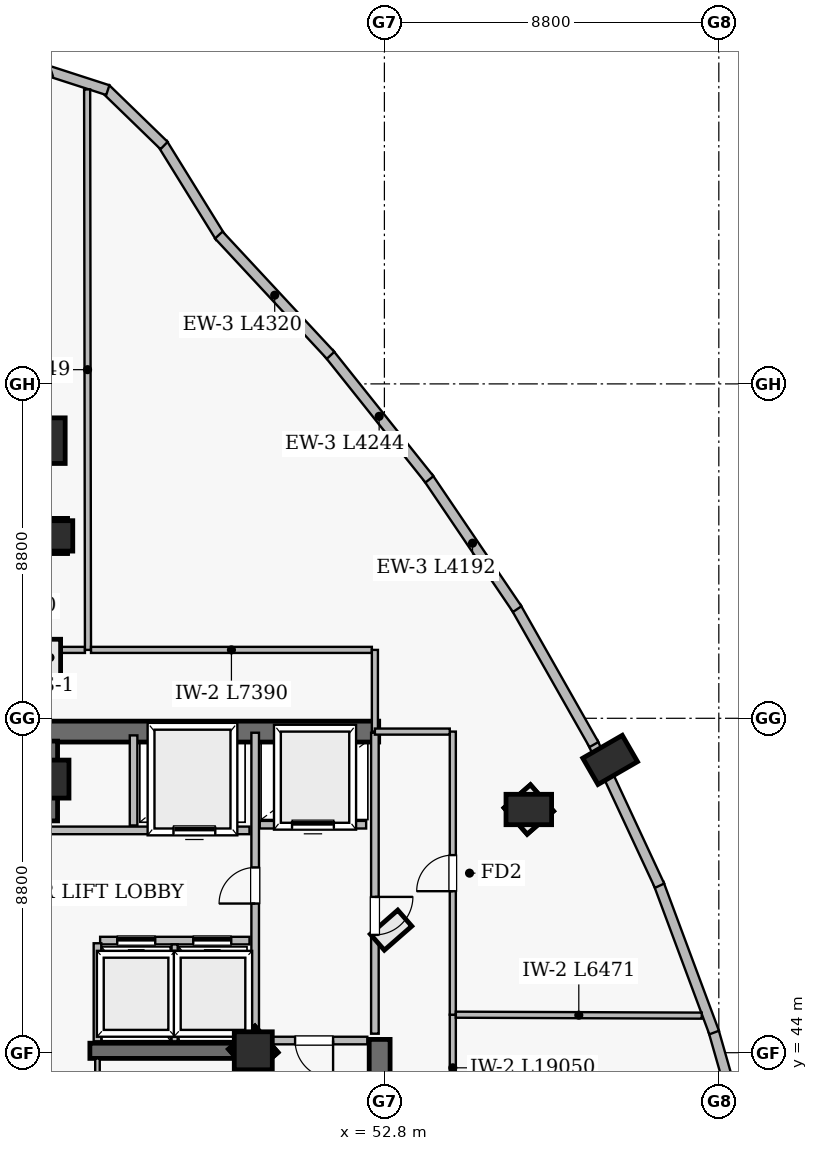
"""IFC4 building model, lengths in metres.
Left out: names, types, materials, properties, quantities, classifications, styles, units other than length and angle.
Written with IfcOpenShell. Run it as: python <this file> out.ifc"""

import sys

from ifc_helpers import new_model, si_unit, direction, frame, frame_2d, origin, origin_2d, place, context, subcontext, project, spatial, rectangle, extrude, element, fill, save


model = new_model("IFC4")
c1 = context("Model", 3, precision=1e-05, world=origin(), true_north=direction((0.0, 1.0)))
c2 = subcontext(c1, "Body", "Model", "MODEL_VIEW")
j1 = project(units=[si_unit("LENGTHUNIT", "METRE"), si_unit("PLANEANGLEUNIT", "RADIAN")], contexts=[c1])
p1 = place(None, origin())
s1 = spatial("IfcSite", under=j1, at=p1, CompositionType="ELEMENT")
p2 = place(p1, origin())
s2 = spatial("IfcBuilding", under=s1, at=p2, CompositionType="ELEMENT")
p3 = place(p2, frame((0.0, 0.0, 184.4)))
s3 = spatial("IfcBuildingStorey", under=s2, at=p3, CompositionType="ELEMENT", Elevation=184.4)
p4 = place(p3, frame((35.35, 52.45, 0.0), z_axis=(0.0, 0.0, 1.0), x_axis=(1.0, 0.0, 0.0)))
e1 = element("IfcWall", 1, at=p4, inside=s3, PredefinedType="SHEAR", context=c2, shape_type="SweptSolid", body=[
    extrude(rectangle(XDim=17.3, YDim=0.55, at=frame_2d((8.65, 0.0))), origin(), (0.0, 0.0, 1.0), 5.1),
])
p5 = place(p3, frame((52.675, 35.05, 0.0), z_axis=(0.0, 0.0, 1.0), x_axis=(0.0, 1.0, 0.0)))
e2 = element("IfcWall", 2, at=p5, inside=s3, PredefinedType="SHEAR", context=c2, shape_type="SweptSolid", body=[
    extrude(rectangle(XDim=9.3, YDim=0.55, at=frame_2d((4.65, 0.0))), origin(), (0.0, 0.0, 1.0), 5.1),
])
p6 = place(p3, frame((49.275, 35.4, 0.0), z_axis=(0.0, 0.0, 1.0), x_axis=(0.0, 1.0, 0.0)))
e3 = element("IfcWall", 3, at=p6, inside=s3, PredefinedType="SHEAR", context=c2, shape_type="SweptSolid", body=[
    extrude(rectangle(XDim=8.95, YDim=0.55, at=frame_2d((4.475, 0.0))), origin(), (0.0, 0.0, 1.0), 5.1),
])
p7 = place(p3, frame((44.0, 50.1, 0.0), z_axis=(0.0, 0.0, 1.0), x_axis=(0.0, 1.0, 0.0)))
e4 = element("IfcWall", 4, at=p7, inside=s3, PredefinedType="SHEAR", context=c2, shape_type="SweptSolid", body=[
    extrude(rectangle(XDim=2.1, YDim=0.4, at=frame_2d((1.05, 0.0))), origin(), (0.0, 0.0, 1.0), 5.1),
])
p8 = place(p3, frame((45.05, 44.05, 0.0), z_axis=(0.0, 0.0, 1.0), x_axis=(1.0, 0.0, 0.0)))
e5 = element("IfcWall", 5, at=p8, inside=s3, PredefinedType="SHEAR", context=c2, shape_type="SweptSolid", body=[
    extrude(rectangle(XDim=4.2, YDim=0.4, at=frame_2d((2.1, 0.0))), origin(), (0.0, 0.0, 1.0), 5.1),
])
for number, where, z_axis, x_axis in (
    (6, (49.35, 44.05, 0.0), (0.0, 0.0, 1.0), (1.0, 0.0, 0.0)),
    (7, (44.0, 51.2, 0.0), (0.0, 0.0, 1.0), (1.0, 0.0, 0.0)),
):
    element("IfcColumn", number, at=place(p3, frame(where, z_axis=z_axis, x_axis=x_axis)), inside=s3, PredefinedType="COLUMN", context=c2, shape_type="SweptSolid", body=[
        extrude(rectangle(XDim=1.0, YDim=1.0, at=origin_2d()), origin(), (0.0, 0.0, 1.0), 5.4),
    ])
for number, where, z_axis, x_axis in (
    (8, (44.0, 57.6, 0.0), (0.0, 0.0, 1.0), (1.0, 0.0, 0.0)),
    (9, (56.6, 50.4, 0.0), (0.0, 0.0, 1.0), (1.0, 0.0, 0.0)),
    (10, (44.0, 60.106, 0.0), (0.0, 0.0, 1.0), (0.0, 1.0, 0.0)),
    (11, (58.74, 51.705, 0.0), (0.0, 0.0, 1.0), (0.866, 0.5, 0.0)),
):
    element("IfcColumn", number, at=place(p3, frame(where, z_axis=z_axis, x_axis=x_axis)), inside=s3, PredefinedType="COLUMN", context=c2, shape_type="SweptSolid", body=[
        extrude(rectangle(XDim=1.2, YDim=0.8, at=origin_2d()), origin(), (0.0, 0.0, 1.0), 5.4),
    ])
p9 = place(p3, frame((48.485, 65.461, 0.0), z_axis=(0.0, 0.0, 1.0), x_axis=(-0.526073462403, 0.850439129012, 0.0)))
e12 = element("IfcWall", 12, at=p9, inside=s3, PredefinedType="SOLIDWALL", context=c2, shape_type="SweptSolid", body=[
    extrude(rectangle(XDim=2.9, YDim=0.27, at=frame_2d((1.45, 0.0))), origin(), (0.0, 0.0, 1.0), 5.1),
])
p10 = place(p3, frame((47.003, 67.873, 0.0), z_axis=(0.0, 0.0, 1.0), x_axis=(-0.717784851278, 0.696264969157, 0.0)))
e13 = element("IfcWall", 13, at=p10, inside=s3, PredefinedType="SOLIDWALL", context=c2, shape_type="SweptSolid", body=[
    extrude(rectangle(XDim=2.144, YDim=0.27, at=frame_2d((1.072, 0.0))), origin(), (0.0, 0.0, 1.0), 5.1),
])
for number, where, z_axis, x_axis in (
    (14, (45.522, 69.331, 0.0), (0.0, 0.0, 1.0), (-0.951, 0.308, 0.0)),
    (15, (44.033, 69.834, 0.0), (0.0, 0.0, 1.0), (-0.951, -0.308, 0.0)),
):
    element("IfcWall", number, at=place(p3, frame(where, z_axis=z_axis, x_axis=x_axis)), inside=s3, PredefinedType="SOLIDWALL", context=c2, shape_type="SweptSolid", body=[
        extrude(rectangle(XDim=1.635, YDim=0.27, at=frame_2d((0.817, 0.0))), origin(), (0.0, 0.0, 1.0), 5.1),
    ])
p11 = place(p3, frame((62.622, 40.516, 0.0), z_axis=(0.0, 0.0, 1.0), x_axis=(-0.274964238992, 0.961454454083, 0.0)))
e16 = element("IfcWall", 16, at=p11, inside=s3, PredefinedType="SOLIDWALL", context=c2, shape_type="SweptSolid", body=[
    extrude(rectangle(XDim=4.244, YDim=0.27, at=frame_2d((2.122, 0.0))), origin(), (0.0, 0.0, 1.0), 5.1),
])
p12 = place(p3, frame((61.477, 44.53, 0.0), z_axis=(0.0, 0.0, 1.0), x_axis=(-0.349022784807, 0.937114238333, 0.0)))
e17 = element("IfcWall", 17, at=p12, inside=s3, PredefinedType="SOLIDWALL", context=c2, shape_type="SweptSolid", body=[
    extrude(rectangle(XDim=4.192, YDim=0.27, at=frame_2d((2.096, 0.0))), origin(), (0.0, 0.0, 1.0), 5.1),
])
p13 = place(p3, frame((60.041, 48.394, 0.0), z_axis=(0.0, 0.0, 1.0), x_axis=(-0.422336806268, 0.906438978681, 0.0)))
e18 = element("IfcWall", 18, at=p13, inside=s3, PredefinedType="SOLIDWALL", context=c2, shape_type="SweptSolid", body=[
    extrude(rectangle(XDim=4.166, YDim=0.27, at=frame_2d((2.083, 0.0))), origin(), (0.0, 0.0, 1.0), 4.588),
])
p14 = place(p3, frame((58.313, 52.109, 0.0), z_axis=(0.0, 0.0, 1.0), x_axis=(-0.49336591454, 0.869821863585, 0.0)))
e19 = element("IfcWall", 19, at=p14, inside=s3, PredefinedType="SOLIDWALL", context=c2, shape_type="SweptSolid", body=[
    extrude(rectangle(XDim=4.166, YDim=0.27, at=frame_2d((2.083, 0.0))), origin(), (0.0, 0.0, 1.0), 4.588),
])
p15 = place(p3, frame((56.295, 55.673, 0.0), z_axis=(0.0, 0.0, 1.0), x_axis=(-0.560853295684, 0.827915201406, 0.0)))
e20 = element("IfcWall", 20, at=p15, inside=s3, PredefinedType="SOLIDWALL", context=c2, shape_type="SweptSolid", body=[
    extrude(rectangle(XDim=4.192, YDim=0.27, at=frame_2d((2.096, 0.0))), origin(), (0.0, 0.0, 1.0), 5.1),
])
p16 = place(p3, frame((53.985, 59.088, 0.0), z_axis=(0.0, 0.0, 1.0), x_axis=(-0.623600005041, 0.781743585655, 0.0)))
e21 = element("IfcWall", 21, at=p16, inside=s3, PredefinedType="SOLIDWALL", context=c2, shape_type="SweptSolid", body=[
    extrude(rectangle(XDim=4.244, YDim=0.27, at=frame_2d((2.122, 0.0))), origin(), (0.0, 0.0, 1.0), 5.1),
])
p17 = place(p3, frame((51.384, 62.352, 0.0), z_axis=(0.0, 0.0, 1.0), x_axis=(-0.68089748503, 0.732378737321, 0.0)))
e22 = element("IfcWall", 22, at=p17, inside=s3, PredefinedType="SOLIDWALL", context=c2, shape_type="SweptSolid", body=[
    extrude(rectangle(XDim=4.32, YDim=0.27, at=frame_2d((2.16, 0.0))), origin(), (0.0, 0.0, 1.0), 5.1),
])
p18 = place(p3, frame((54.6, 33.4, 0.0), z_axis=(0.0, 0.0, 1.0), x_axis=(0.0, 1.0, 0.0)))
e23 = element("IfcWall", 23, at=p18, inside=s3, PredefinedType="SOLIDWALL", context=c2, shape_type="SweptSolid", body=[
    extrude(rectangle(XDim=11.6, YDim=0.16, at=frame_2d((5.8, 0.0))), origin(), (0.0, 0.0, 1.0), 4.188),
])
p19 = place(p18, frame((4.605, 0.0, 0.0)))
e24 = element("IfcOpeningElement", 24, at=p19, cuts=e23, PredefinedType="OPENING", context=c2, shape_type="SweptSolid", body=[
    extrude(rectangle(XDim=0.95, YDim=2.15, at=frame_2d((0.475, 1.075))), frame((0.0, 0.09, 0.0), z_axis=(0.0, -1.0, 0.0), x_axis=(1.0, 0.0, 0.0)), (0.0, 0.0, 1.0), 0.18),
])
p20 = place(p3, frame((44.92, 54.6, 0.0), z_axis=(0.0, 0.0, 1.0), x_axis=(-1.0, 0.0, 0.0)))
e25 = element("IfcWall", 25, at=p20, inside=s3, PredefinedType="SOLIDWALL", context=c2, shape_type="SweptSolid", body=[
    extrude(rectangle(XDim=11.44, YDim=0.16, at=frame_2d((5.72, 0.0))), origin(), (0.0, 0.0, 1.0), 4.188),
])
p21 = place(p20, frame((5.245, 0.0, 0.0)))
e26 = element("IfcOpeningElement", 26, at=p21, cuts=e25, PredefinedType="OPENING", context=c2, shape_type="SweptSolid", body=[
    extrude(rectangle(XDim=0.95, YDim=2.15, at=frame_2d((0.475, 1.075))), frame((0.0, 0.09, 0.0), z_axis=(0.0, -1.0, 0.0), x_axis=(1.0, 0.0, 0.0)), (0.0, 0.0, 1.0), 0.18),
])
p22 = place(p3, frame((45.25, 35.6, 0.0), z_axis=(0.0, 0.0, 1.0), x_axis=(0.0, 1.0, 0.0)))
e27 = element("IfcWall", 27, at=p22, inside=s3, PredefinedType="PARTITIONING", context=c2, shape_type="SweptSolid", body=[
    extrude(rectangle(XDim=8.25, YDim=0.12, at=frame_2d((4.125, 0.0))), origin(), (0.0, 0.0, 1.0), 5.1),
])
p23 = place(p22, frame((2.05, 0.0, 0.0)))
e28 = element("IfcOpeningElement", 28, at=p23, cuts=e27, PredefinedType="OPENING", context=c2, shape_type="SweptSolid", body=[
    extrude(rectangle(XDim=0.9, YDim=2.1, at=frame_2d((0.45, 1.05))), frame((0.0, 0.07, 0.0), z_axis=(0.0, -1.0, 0.0), x_axis=(1.0, 0.0, 0.0)), (0.0, 0.0, 1.0), 0.14),
])
p24 = place(p22, frame((6.26, 0.0, 0.0)))
e29 = element("IfcOpeningElement", 29, at=p24, cuts=e27, PredefinedType="OPENING", context=c2, shape_type="SweptSolid", body=[
    extrude(rectangle(XDim=0.88, YDim=2.1, at=frame_2d((0.44, 1.05))), frame((0.0, 0.07, 0.0), z_axis=(0.0, -1.0, 0.0), x_axis=(1.0, 0.0, 0.0)), (0.0, 0.0, 1.0), 0.14),
])
p25 = place(p3, frame((52.55, 44.5, 0.0), z_axis=(0.0, 0.0, 1.0), x_axis=(0.0, 1.0, 0.0)))
e30 = element("IfcWall", 30, at=p25, inside=s3, PredefinedType="SOLIDWALL", context=c2, shape_type="SweptSolid", body=[
    extrude(rectangle(XDim=7.92, YDim=0.2, at=frame_2d((3.96, 0.0))), origin(), (0.0, 0.0, 1.0), 5.1),
])
p26 = place(p25, frame((2.6, 0.0, 0.0)))
e31 = element("IfcOpeningElement", 31, at=p26, cuts=e30, PredefinedType="OPENING", context=c2, shape_type="SweptSolid", body=[
    extrude(rectangle(XDim=1.0, YDim=2.15, at=frame_2d((0.5, 1.075))), frame((0.0, 0.11, 0.0), z_axis=(0.0, -1.0, 0.0), x_axis=(1.0, 0.0, 0.0)), (0.0, 0.0, 1.0), 0.22),
])
p27 = place(p3, frame((49.4, 44.5, 0.0), z_axis=(0.0, 0.0, 1.0), x_axis=(0.0, 1.0, 0.0)))
e32 = element("IfcWall", 32, at=p27, inside=s3, PredefinedType="SOLIDWALL", context=c2, shape_type="SweptSolid", body=[
    extrude(rectangle(XDim=7.92, YDim=0.2, at=frame_2d((3.96, 0.0))), origin(), (0.0, 0.0, 1.0), 4.188),
])
p28 = place(p27, frame((3.425, 0.0, 0.0)))
e33 = element("IfcOpeningElement", 33, at=p28, cuts=e32, PredefinedType="OPENING", context=c2, shape_type="SweptSolid", body=[
    extrude(rectangle(XDim=0.95, YDim=2.15, at=frame_2d((0.475, 1.075))), frame((0.0, 0.11, 0.0), z_axis=(0.0, -1.0, 0.0), x_axis=(1.0, 0.0, 0.0)), (0.0, 0.0, 1.0), 0.22),
])
p29 = place(p3, frame((54.6, 45.0, 0.0), z_axis=(0.0, 0.0, 1.0), x_axis=(0.0, 1.0, 0.0)))
e34 = element("IfcWall", 34, at=p29, inside=s3, PredefinedType="SOLIDWALL", context=c2, shape_type="SweptSolid", body=[
    extrude(rectangle(XDim=7.45, YDim=0.16, at=frame_2d((3.725, 0.0))), origin(), (0.0, 0.0, 1.0), 4.188),
])
p30 = place(p29, frame((3.25, 0.0, 0.0)))
e35 = element("IfcOpeningElement", 35, at=p30, cuts=e34, PredefinedType="OPENING", context=c2, shape_type="SweptSolid", body=[
    extrude(rectangle(XDim=0.95, YDim=2.15, at=frame_2d((0.475, 1.075))), frame((0.0, 0.09, 0.0), z_axis=(0.0, -1.0, 0.0), x_axis=(1.0, 0.0, 0.0)), (0.0, 0.0, 1.0), 0.18),
])
p31 = place(p3, frame((43.75, 49.85, 0.0), z_axis=(0.0, 0.0, 1.0), x_axis=(1.0, 0.0, 0.0)))
e36 = element("IfcWall", 36, at=p31, inside=s3, PredefinedType="SOLIDWALL", context=c2, shape_type="SweptSolid", body=[
    extrude(rectangle(XDim=5.5, YDim=0.2, at=frame_2d((2.75, 0.0))), origin(), (0.0, 0.0, 1.0), 4.188),
])
p32 = place(p31, frame((3.5, 0.0, 0.0)))
e37 = element("IfcOpeningElement", 37, at=p32, cuts=e36, PredefinedType="OPENING", context=c2, shape_type="SweptSolid", body=[
    extrude(rectangle(XDim=1.1, YDim=2.15, at=frame_2d((0.55, 1.075))), frame((0.0, 0.11, 0.0), z_axis=(0.0, -1.0, 0.0), x_axis=(1.0, 0.0, 0.0)), (0.0, 0.0, 1.0), 0.22),
])
p33 = place(p3, frame((45.32, 46.95, 0.0), z_axis=(0.0, 0.0, 1.0), x_axis=(1.0, 0.0, 0.0)))
e38 = element("IfcWall", 38, at=p33, inside=s3, PredefinedType="SOLIDWALL", context=c2, shape_type="SweptSolid", body=[
    extrude(rectangle(XDim=3.93, YDim=0.2, at=frame_2d((1.965, 0.0))), origin(), (0.0, 0.0, 1.0), 4.188),
])
p34 = place(p33, frame((0.45, 0.0, 0.0)))
e39 = element("IfcOpeningElement", 39, at=p34, cuts=e38, PredefinedType="OPENING", context=c2, shape_type="SweptSolid", body=[
    extrude(rectangle(XDim=1.0, YDim=2.15, at=frame_2d((0.5, 1.075))), frame((0.0, 0.11, 0.0), z_axis=(0.0, -1.0, 0.0), x_axis=(1.0, 0.0, 0.0)), (0.0, 0.0, 1.0), 0.22),
])
p35 = place(p33, frame((2.45, 0.0, 0.0)))
e40 = element("IfcOpeningElement", 40, at=p35, cuts=e38, PredefinedType="OPENING", context=c2, shape_type="SweptSolid", body=[
    extrude(rectangle(XDim=1.0, YDim=2.15, at=frame_2d((0.5, 1.075))), frame((0.0, 0.11, 0.0), z_axis=(0.0, -1.0, 0.0), x_axis=(1.0, 0.0, 0.0)), (0.0, 0.0, 1.0), 0.22),
])
p36 = place(p3, frame((49.55, 44.32, 0.0), z_axis=(0.0, 0.0, 1.0), x_axis=(1.0, 0.0, 0.0)))
e41 = element("IfcWall", 41, at=p36, inside=s3, PredefinedType="SOLIDWALL", context=c2, shape_type="SweptSolid", body=[
    extrude(rectangle(XDim=2.8, YDim=0.2, at=frame_2d((1.4, 0.0))), origin(), (0.0, 0.0, 1.0), 4.188),
])
p37 = place(p36, frame((0.9, 0.0, 0.0)))
e42 = element("IfcOpeningElement", 42, at=p37, cuts=e41, PredefinedType="OPENING", context=c2, shape_type="SweptSolid", body=[
    extrude(rectangle(XDim=1.0, YDim=2.15, at=frame_2d((0.5, 1.075))), frame((0.0, 0.11, 0.0), z_axis=(0.0, -1.0, 0.0), x_axis=(1.0, 0.0, 0.0)), (0.0, 0.0, 1.0), 0.22),
])
p38 = place(p3, frame((49.52, 50.0, 0.0), z_axis=(0.0, 0.0, 1.0), x_axis=(1.0, 0.0, 0.0)))
e43 = element("IfcWall", 43, at=p38, inside=s3, PredefinedType="SOLIDWALL", context=c2, shape_type="SweptSolid", body=[
    extrude(rectangle(XDim=2.8, YDim=0.2, at=frame_2d((1.4, 0.0))), origin(), (0.0, 0.0, 1.0), 5.1),
])
p39 = place(p38, frame((0.85, 0.0, 0.0)))
e44 = element("IfcOpeningElement", 44, at=p39, cuts=e43, PredefinedType="OPENING", context=c2, shape_type="SweptSolid", body=[
    extrude(rectangle(XDim=1.1, YDim=2.15, at=frame_2d((0.55, 1.075))), frame((0.0, 0.11, 0.0), z_axis=(0.0, -1.0, 0.0), x_axis=(1.0, 0.0, 0.0)), (0.0, 0.0, 1.0), 0.22),
])
p40 = place(p3, frame((45.0, 54.6, 0.0), z_axis=(0.0, 0.0, 1.0), x_axis=(-0.001489768591, 0.999998890294, 0.0)))
e45 = element("IfcWall", 45, at=p40, inside=s3, PredefinedType="SOLIDWALL", context=c2, shape_type="SweptSolid", body=[
    extrude(rectangle(XDim=14.749, YDim=0.16, at=frame_2d((7.375, 0.0))), origin(), (0.0, 0.0, 1.0), 4.188),
])
p41 = place(p3, frame((52.47, 54.6, 0.0), z_axis=(0.0, 0.0, 1.0), x_axis=(-1.0, 0.0, 0.0)))
e46 = element("IfcWall", 46, at=p41, inside=s3, PredefinedType="SOLIDWALL", context=c2, shape_type="SweptSolid", body=[
    extrude(rectangle(XDim=7.39, YDim=0.16, at=frame_2d((3.695, 0.0))), origin(), (0.0, 0.0, 1.0), 4.188),
])
p42 = place(p3, frame((61.151, 44.975, 0.0), z_axis=(0.0, 0.0, 1.0), x_axis=(-0.999992595258, 0.003848302008, 0.0)))
e47 = element("IfcWall", 47, at=p42, inside=s3, PredefinedType="SOLIDWALL", context=c2, shape_type="SweptSolid", body=[
    extrude(rectangle(XDim=6.471, YDim=0.16, at=frame_2d((3.235, 0.0))), origin(), (0.0, 0.0, 1.0), 4.188),
])
p43 = place(p3, frame((45.25, 44.3, 0.0), z_axis=(0.0, 0.0, 1.0), x_axis=(0.0, 1.0, 0.0)))
e48 = element("IfcWall", 48, at=p43, inside=s3, PredefinedType="SOLIDWALL", context=c2, shape_type="SweptSolid", body=[
    extrude(rectangle(XDim=2.58, YDim=0.2, at=frame_2d((1.29, 0.0))), origin(), (0.0, 0.0, 1.0), 5.1),
])
p44 = place(p3, frame((47.28, 44.3, 0.0), z_axis=(0.0, 0.0, 1.0), x_axis=(0.0, 1.0, 0.0)))
e49 = element("IfcWall", 49, at=p44, inside=s3, PredefinedType="SOLIDWALL", context=c2, shape_type="SweptSolid", body=[
    extrude(rectangle(XDim=2.55, YDim=0.16, at=frame_2d((1.275, 0.0))), origin(), (0.0, 0.0, 1.0), 4.188),
])
p45 = place(p3, frame((46.2, 49.98, 0.0), z_axis=(0.0, 0.0, 1.0), x_axis=(0.0, 1.0, 0.0)))
e50 = element("IfcWall", 50, at=p45, inside=s3, PredefinedType="SOLIDWALL", context=c2, shape_type="SweptSolid", body=[
    extrude(rectangle(XDim=2.37, YDim=0.2, at=frame_2d((1.185, 0.0))), origin(), (0.0, 0.0, 1.0), 5.1),
])
p46 = place(p3, frame((52.55, 52.45, 0.0), z_axis=(0.0, 0.0, 1.0), x_axis=(0.0, 1.0, 0.0)))
e51 = element("IfcWall", 51, at=p46, inside=s3, PredefinedType="SOLIDWALL", context=c2, shape_type="SweptSolid", body=[
    extrude(rectangle(XDim=2.15, YDim=0.16, at=frame_2d((1.075, 0.0))), origin(), (0.0, 0.0, 1.0), 4.188),
])
p47 = place(p3, frame((54.52, 52.45, 0.0), z_axis=(0.0, 0.0, 1.0), x_axis=(-1.0, 0.0, 0.0)))
e52 = element("IfcWall", 52, at=p47, inside=s3, PredefinedType="SOLIDWALL", context=c2, shape_type="SweptSolid", body=[
    extrude(rectangle(XDim=1.97, YDim=0.16, at=frame_2d((0.985, 0.0))), origin(), (0.0, 0.0, 1.0), 4.188),
])
p48 = place(p37, frame((1.0, 0.0, 0.0), z_axis=(0.0, 0.0, 1.0), x_axis=(-1.0, 0.0, 0.0)))
e53 = element("IfcDoor", 53, at=p48, inside=s3, OperationType="SINGLE_SWING_RIGHT", PredefinedType="DOOR", context=c2, shape_type="SweptSolid", body=[
    extrude(rectangle(XDim=1.0, YDim=2.15, at=frame_2d((0.5, 1.075))), frame((0.0, 0.025, 0.0), z_axis=(0.0, -1.0, 0.0), x_axis=(1.0, 0.0, 0.0)), (0.0, 0.0, 1.0), 0.05),
])
fill(e42, e53)
p49 = place(p26, frame((1.0, 0.0, 0.0), z_axis=(0.0, 0.0, 1.0), x_axis=(-1.0, 0.0, 0.0)))
e54 = element("IfcDoor", 54, at=p49, inside=s3, OperationType="SINGLE_SWING_RIGHT", PredefinedType="DOOR", context=c2, shape_type="SweptSolid", body=[
    extrude(rectangle(XDim=1.0, YDim=2.15, at=frame_2d((0.5, 1.075))), frame((0.0, 0.025, 0.0), z_axis=(0.0, -1.0, 0.0), x_axis=(1.0, 0.0, 0.0)), (0.0, 0.0, 1.0), 0.05),
])
fill(e31, e54)
p50 = place(p28, origin())
e55 = element("IfcDoor", 55, at=p50, inside=s3, OperationType="SINGLE_SWING_LEFT", PredefinedType="DOOR", context=c2, shape_type="SweptSolid", body=[
    extrude(rectangle(XDim=0.95, YDim=2.15, at=frame_2d((0.475, 1.075))), frame((0.0, 0.025, 0.0), z_axis=(0.0, -1.0, 0.0), x_axis=(1.0, 0.0, 0.0)), (0.0, 0.0, 1.0), 0.05),
])
fill(e33, e55)
p51 = place(p39, origin())
e56 = element("IfcDoor", 56, at=p51, inside=s3, OperationType="SLIDING_TO_LEFT", PredefinedType="DOOR", context=c2, shape_type="SweptSolid", body=[
    extrude(rectangle(XDim=1.1, YDim=2.15, at=frame_2d((0.55, 1.075))), frame((0.0, 0.025, 0.0), z_axis=(0.0, -1.0, 0.0), x_axis=(1.0, 0.0, 0.0)), (0.0, 0.0, 1.0), 0.05),
])
fill(e44, e56)
p52 = place(p32, origin())
e57 = element("IfcDoor", 57, at=p52, inside=s3, OperationType="SLIDING_TO_LEFT", PredefinedType="DOOR", context=c2, shape_type="SweptSolid", body=[
    extrude(rectangle(XDim=1.1, YDim=2.15, at=frame_2d((0.55, 1.075))), frame((0.0, 0.025, 0.0), z_axis=(0.0, -1.0, 0.0), x_axis=(1.0, 0.0, 0.0)), (0.0, 0.0, 1.0), 0.05),
])
fill(e37, e57)
p53 = place(p34, origin())
e58 = element("IfcDoor", 58, at=p53, inside=s3, OperationType="SLIDING_TO_LEFT", PredefinedType="DOOR", context=c2, shape_type="SweptSolid", body=[
    extrude(rectangle(XDim=1.0, YDim=2.15, at=frame_2d((0.5, 1.075))), frame((0.0, 0.025, 0.0), z_axis=(0.0, -1.0, 0.0), x_axis=(1.0, 0.0, 0.0)), (0.0, 0.0, 1.0), 0.05),
])
fill(e39, e58)
p54 = place(p35, origin())
e59 = element("IfcDoor", 59, at=p54, inside=s3, OperationType="SLIDING_TO_LEFT", PredefinedType="DOOR", context=c2, shape_type="SweptSolid", body=[
    extrude(rectangle(XDim=1.0, YDim=2.15, at=frame_2d((0.5, 1.075))), frame((0.0, 0.025, 0.0), z_axis=(0.0, -1.0, 0.0), x_axis=(1.0, 0.0, 0.0)), (0.0, 0.0, 1.0), 0.05),
])
fill(e40, e59)
p55 = place(p30, origin())
e60 = element("IfcDoor", 60, at=p55, inside=s3, OperationType="SINGLE_SWING_LEFT", PredefinedType="DOOR", context=c2, shape_type="SweptSolid", body=[
    extrude(rectangle(XDim=0.95, YDim=2.15, at=frame_2d((0.475, 1.075))), frame((0.0, 0.025, 0.0), z_axis=(0.0, -1.0, 0.0), x_axis=(1.0, 0.0, 0.0)), (0.0, 0.0, 1.0), 0.05),
])
fill(e35, e60)
save(model, sys.argv[1])
